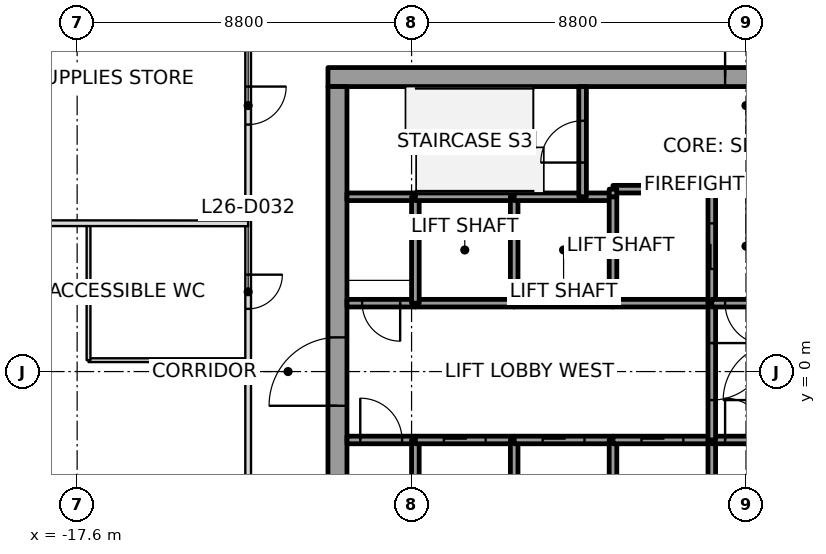
"""IFC4 building model, lengths in metres.
Left out: names, types, materials, properties, quantities, classifications, styles, units other than length and angle.
Written with IfcOpenShell. Run it as: python <this file> out.ifc"""

import sys

from ifc_helpers import new_model, si_unit, direction, frame, frame_2d, origin, place, context, subcontext, project, spatial, rectangle, extrude, element, fill, save


model = new_model("IFC4")
c1 = context("Model", 3, precision=1e-05, world=origin(), true_north=direction((0.0, 1.0)))
c2 = subcontext(c1, "Body", "Model", "MODEL_VIEW")
j1 = project(units=[si_unit("LENGTHUNIT", "METRE"), si_unit("PLANEANGLEUNIT", "RADIAN")], contexts=[c1])
p1 = place(None, origin())
s1 = spatial("IfcSite", under=j1, at=p1, CompositionType="ELEMENT")
p2 = place(p1, origin())
s2 = spatial("IfcBuilding", under=s1, at=p2, CompositionType="ELEMENT")
p3 = place(p2, frame((0.0, 0.0, 125.8)))
s3 = spatial("IfcBuildingStorey", under=s2, at=p3, CompositionType="ELEMENT", Elevation=125.8)
p4 = place(p3, frame((-11.0, 7.75, 0.0), z_axis=(0.0, 0.0, 1.0), x_axis=(1.0, 0.0, 0.0)))
e1 = element("IfcWall", 1, at=p4, inside=s3, PredefinedType="SHEAR", context=c2, shape_type="SweptSolid", body=[
    extrude(rectangle(XDim=22.0, YDim=0.5, at=frame_2d((11.0, 0.0))), origin(), (0.0, 0.0, 1.0), 4.0),
])
p5 = place(p4, frame((10.45, 0.0, 0.0)))
e2 = element("IfcOpeningElement", 2, at=p5, cuts=e1, PredefinedType="OPENING", context=c2, shape_type="SweptSolid", body=[
    extrude(rectangle(XDim=1.1, YDim=2.1, at=frame_2d((0.55, 1.05))), frame((0.0, 0.25, 0.0), z_axis=(0.0, -1.0, 0.0), x_axis=(1.0, 0.0, 0.0)), (0.0, 0.0, 1.0), 0.5),
])
p6 = place(p3, frame((-10.75, -7.5, 0.0), z_axis=(0.0, 0.0, 1.0), x_axis=(0.0, 1.0, 0.0)))
e3 = element("IfcWall", 3, at=p6, inside=s3, PredefinedType="SHEAR", context=c2, shape_type="SweptSolid", body=[
    extrude(rectangle(XDim=15.0, YDim=0.5, at=frame_2d((7.5, 0.0))), origin(), (0.0, 0.0, 1.0), 4.0),
])
p7 = place(p6, frame((6.6, 0.0, 0.0)))
e4 = element("IfcOpeningElement", 4, at=p7, cuts=e3, PredefinedType="OPENING", context=c2, shape_type="SweptSolid", body=[
    extrude(rectangle(XDim=1.8, YDim=2.1, at=frame_2d((0.9, 1.05))), frame((0.0, 0.25, 0.0), z_axis=(0.0, -1.0, 0.0), x_axis=(1.0, 0.0, 0.0)), (0.0, 0.0, 1.0), 0.5),
])
p8 = place(p3, frame((-10.5, -1.8, 0.0), z_axis=(0.0, 0.0, 1.0), x_axis=(1.0, 0.0, 0.0)))
e5 = element("IfcWall", 5, at=p8, inside=s3, PredefinedType="SOLIDWALL", context=c2, shape_type="SweptSolid", body=[
    extrude(rectangle(XDim=1.8, YDim=0.2, at=frame_2d((0.9, 0.0))), origin(), (0.0, 0.0, 1.0), 3.85),
])
p9 = place(p8, frame((0.35, 0.0, 0.0)))
e6 = element("IfcOpeningElement", 6, at=p9, cuts=e5, PredefinedType="OPENING", context=c2, shape_type="SweptSolid", body=[
    extrude(rectangle(XDim=1.1, YDim=2.1, at=frame_2d((0.55, 1.05))), frame((0.0, 0.1, 0.0), z_axis=(0.0, -1.0, 0.0), x_axis=(1.0, 0.0, 0.0)), (0.0, 0.0, 1.0), 0.2),
])
p10 = place(p3, frame((-8.7, 1.8, 0.0), z_axis=(0.0, 0.0, 1.0), x_axis=(-1.0, 0.0, 0.0)))
e7 = element("IfcWall", 7, at=p10, inside=s3, PredefinedType="SOLIDWALL", context=c2, shape_type="SweptSolid", body=[
    extrude(rectangle(XDim=1.8, YDim=0.2, at=frame_2d((0.9, 0.0))), origin(), (0.0, 0.0, 1.0), 3.85),
])
p11 = place(p10, frame((0.4, 0.0, 0.0)))
e8 = element("IfcOpeningElement", 8, at=p11, cuts=e7, PredefinedType="OPENING", context=c2, shape_type="SweptSolid", body=[
    extrude(rectangle(XDim=1.0, YDim=2.1, at=frame_2d((0.5, 1.05))), frame((0.0, 0.1, 0.0), z_axis=(0.0, -1.0, 0.0), x_axis=(1.0, 0.0, 0.0)), (0.0, 0.0, 1.0), 0.2),
])
p12 = place(p3, frame((-8.7, 4.6, 0.0), z_axis=(0.0, 0.0, 1.0), x_axis=(-1.0, 0.0, 0.0)))
e9 = element("IfcWall", 9, at=p12, inside=s3, PredefinedType="SOLIDWALL", context=c2, shape_type="SweptSolid", body=[
    extrude(rectangle(XDim=1.8, YDim=0.2, at=frame_2d((0.9, 0.0))), origin(), (0.0, 0.0, 1.0), 3.85),
])
p13 = place(p3, frame((-8.7, -4.6, 0.0), z_axis=(0.0, 0.0, 1.0), x_axis=(0.0, 1.0, 0.0)))
e10 = element("IfcWall", 10, at=p13, inside=s3, PredefinedType="SOLIDWALL", context=c2, shape_type="SweptSolid", body=[
    extrude(rectangle(XDim=2.8, YDim=0.2, at=frame_2d((1.4, 0.0))), origin(), (0.0, 0.0, 1.0), 3.85),
])
p14 = place(p3, frame((-8.7, -1.8, 0.0), z_axis=(0.0, 0.0, 1.0), x_axis=(1.0, 0.0, 0.0)))
e11 = element("IfcWall", 11, at=p14, inside=s3, PredefinedType="SOLIDWALL", context=c2, shape_type="SweptSolid", body=[
    extrude(rectangle(XDim=2.6, YDim=0.2, at=frame_2d((1.3, 0.0))), origin(), (0.0, 0.0, 1.0), 3.85),
])
p15 = place(p14, frame((0.75, 0.0, 0.0)))
e12 = element("IfcOpeningElement", 12, at=p15, cuts=e11, PredefinedType="OPENING", context=c2, shape_type="SweptSolid", body=[
    extrude(rectangle(XDim=1.1, YDim=2.1, at=frame_2d((0.55, 1.05))), frame((0.0, 0.1, 0.0), z_axis=(0.0, -1.0, 0.0), x_axis=(1.0, 0.0, 0.0)), (0.0, 0.0, 1.0), 0.2),
])
p16 = place(p3, frame((-6.1, 1.8, 0.0), z_axis=(0.0, 0.0, 1.0), x_axis=(-1.0, 0.0, 0.0)))
e13 = element("IfcWall", 13, at=p16, inside=s3, PredefinedType="SOLIDWALL", context=c2, shape_type="SweptSolid", body=[
    extrude(rectangle(XDim=2.6, YDim=0.2, at=frame_2d((1.3, 0.0))), origin(), (0.0, 0.0, 1.0), 3.85),
])
p17 = place(p3, frame((-8.7, 1.8, 0.0), z_axis=(0.0, 0.0, 1.0), x_axis=(0.0, 1.0, 0.0)))
e14 = element("IfcWall", 14, at=p17, inside=s3, PredefinedType="SOLIDWALL", context=c2, shape_type="SweptSolid", body=[
    extrude(rectangle(XDim=2.8, YDim=0.2, at=frame_2d((1.4, 0.0))), origin(), (0.0, 0.0, 1.0), 3.85),
])
p18 = place(p3, frame((-6.1, 4.6, 0.0), z_axis=(0.0, 0.0, 1.0), x_axis=(-1.0, 0.0, 0.0)))
e15 = element("IfcWall", 15, at=p18, inside=s3, PredefinedType="SOLIDWALL", context=c2, shape_type="SweptSolid", body=[
    extrude(rectangle(XDim=2.6, YDim=0.2, at=frame_2d((1.3, 0.0))), origin(), (0.0, 0.0, 1.0), 3.85),
])
p19 = place(p3, frame((-6.1, -4.6, 0.0), z_axis=(0.0, 0.0, 1.0), x_axis=(0.0, 1.0, 0.0)))
e16 = element("IfcWall", 16, at=p19, inside=s3, PredefinedType="SOLIDWALL", context=c2, shape_type="SweptSolid", body=[
    extrude(rectangle(XDim=2.8, YDim=0.2, at=frame_2d((1.4, 0.0))), origin(), (0.0, 0.0, 1.0), 3.85),
])
p20 = place(p3, frame((-6.1, -1.8, 0.0), z_axis=(0.0, 0.0, 1.0), x_axis=(1.0, 0.0, 0.0)))
e17 = element("IfcWall", 17, at=p20, inside=s3, PredefinedType="SOLIDWALL", context=c2, shape_type="SweptSolid", body=[
    extrude(rectangle(XDim=2.6, YDim=0.2, at=frame_2d((1.3, 0.0))), origin(), (0.0, 0.0, 1.0), 3.85),
])
p21 = place(p20, frame((0.75, 0.0, 0.0)))
e18 = element("IfcOpeningElement", 18, at=p21, cuts=e17, PredefinedType="OPENING", context=c2, shape_type="SweptSolid", body=[
    extrude(rectangle(XDim=1.1, YDim=2.1, at=frame_2d((0.55, 1.05))), frame((0.0, 0.1, 0.0), z_axis=(0.0, -1.0, 0.0), x_axis=(1.0, 0.0, 0.0)), (0.0, 0.0, 1.0), 0.2),
])
p22 = place(p3, frame((-3.5, 1.8, 0.0), z_axis=(0.0, 0.0, 1.0), x_axis=(-1.0, 0.0, 0.0)))
e19 = element("IfcWall", 19, at=p22, inside=s3, PredefinedType="SOLIDWALL", context=c2, shape_type="SweptSolid", body=[
    extrude(rectangle(XDim=2.6, YDim=0.2, at=frame_2d((1.3, 0.0))), origin(), (0.0, 0.0, 1.0), 3.85),
])
p23 = place(p3, frame((-6.1, 1.8, 0.0), z_axis=(0.0, 0.0, 1.0), x_axis=(0.0, 1.0, 0.0)))
e20 = element("IfcWall", 20, at=p23, inside=s3, PredefinedType="SOLIDWALL", context=c2, shape_type="SweptSolid", body=[
    extrude(rectangle(XDim=2.8, YDim=0.2, at=frame_2d((1.4, 0.0))), origin(), (0.0, 0.0, 1.0), 3.85),
])
p24 = place(p3, frame((-4.3, 4.6, 0.0), z_axis=(0.0, 0.0, 1.0), x_axis=(-1.0, 0.0, 0.0)))
e21 = element("IfcWall", 21, at=p24, inside=s3, PredefinedType="SOLIDWALL", context=c2, shape_type="SweptSolid", body=[
    extrude(rectangle(XDim=1.8, YDim=0.2, at=frame_2d((0.9, 0.0))), origin(), (0.0, 0.0, 1.0), 3.85),
])
p25 = place(p3, frame((-3.5, 4.6, 0.0), z_axis=(0.0, 0.0, 1.0), x_axis=(-1.0, 0.0, 0.0)))
e22 = element("IfcWall", 22, at=p25, inside=s3, PredefinedType="SOLIDWALL", context=c2, shape_type="SweptSolid", body=[
    extrude(rectangle(XDim=0.8, YDim=0.2, at=frame_2d((0.4, 0.0))), origin(), (0.0, 0.0, 1.0), 3.85),
])
p26 = place(p3, frame((-4.3, 4.6, 0.0), z_axis=(0.0, 0.0, 1.0), x_axis=(0.0, 1.0, 0.0)))
e23 = element("IfcWall", 23, at=p26, inside=s3, PredefinedType="SOLIDWALL", context=c2, shape_type="SweptSolid", body=[
    extrude(rectangle(XDim=2.9, YDim=0.2, at=frame_2d((1.45, 0.0))), origin(), (0.0, 0.0, 1.0), 3.85),
])
p27 = place(p26, frame((0.9, 0.0, 0.0)))
e24 = element("IfcOpeningElement", 24, at=p27, cuts=e23, PredefinedType="OPENING", context=c2, shape_type="SweptSolid", body=[
    extrude(rectangle(XDim=1.1, YDim=2.1, at=frame_2d((0.55, 1.05))), frame((0.0, 0.1, 0.0), z_axis=(0.0, -1.0, 0.0), x_axis=(1.0, 0.0, 0.0)), (0.0, 0.0, 1.0), 0.2),
])
p28 = place(p3, frame((-3.5, -4.6, 0.0), z_axis=(0.0, 0.0, 1.0), x_axis=(0.0, 1.0, 0.0)))
e25 = element("IfcWall", 25, at=p28, inside=s3, PredefinedType="SOLIDWALL", context=c2, shape_type="SweptSolid", body=[
    extrude(rectangle(XDim=2.8, YDim=0.2, at=frame_2d((1.4, 0.0))), origin(), (0.0, 0.0, 1.0), 3.85),
])
p29 = place(p3, frame((-3.5, -1.8, 0.0), z_axis=(0.0, 0.0, 1.0), x_axis=(1.0, 0.0, 0.0)))
e26 = element("IfcWall", 26, at=p29, inside=s3, PredefinedType="SOLIDWALL", context=c2, shape_type="SweptSolid", body=[
    extrude(rectangle(XDim=2.6, YDim=0.2, at=frame_2d((1.3, 0.0))), origin(), (0.0, 0.0, 1.0), 3.85),
])
p30 = place(p29, frame((0.75, 0.0, 0.0)))
e27 = element("IfcOpeningElement", 27, at=p30, cuts=e26, PredefinedType="OPENING", context=c2, shape_type="SweptSolid", body=[
    extrude(rectangle(XDim=1.1, YDim=2.1, at=frame_2d((0.55, 1.05))), frame((0.0, 0.1, 0.0), z_axis=(0.0, -1.0, 0.0), x_axis=(1.0, 0.0, 0.0)), (0.0, 0.0, 1.0), 0.2),
])
p31 = place(p3, frame((-0.9, 1.8, 0.0), z_axis=(0.0, 0.0, 1.0), x_axis=(-1.0, 0.0, 0.0)))
e28 = element("IfcWall", 28, at=p31, inside=s3, PredefinedType="SOLIDWALL", context=c2, shape_type="SweptSolid", body=[
    extrude(rectangle(XDim=2.6, YDim=0.2, at=frame_2d((1.3, 0.0))), origin(), (0.0, 0.0, 1.0), 3.85),
])
p32 = place(p3, frame((-3.5, 4.6, 0.0), z_axis=(0.0, 0.0, 1.0), x_axis=(0.0, -1.0, 0.0)))
e29 = element("IfcWall", 29, at=p32, inside=s3, PredefinedType="SOLIDWALL", context=c2, shape_type="SweptSolid", body=[
    extrude(rectangle(XDim=2.8, YDim=0.2, at=frame_2d((1.4, 0.0))), origin(), (0.0, 0.0, 1.0), 3.85),
])
p33 = place(p3, frame((-0.9, 1.8, 0.0), z_axis=(0.0, 0.0, 1.0), x_axis=(0.0, 1.0, 0.0)))
e30 = element("IfcWall", 30, at=p33, inside=s3, PredefinedType="SOLIDWALL", context=c2, shape_type="SweptSolid", body=[
    extrude(rectangle(XDim=3.0, YDim=0.2, at=frame_2d((1.5, 0.0))), origin(), (0.0, 0.0, 1.0), 3.85),
])
p34 = place(p33, frame((0.9, 0.0, 0.0)))
e31 = element("IfcOpeningElement", 31, at=p34, cuts=e30, PredefinedType="OPENING", context=c2, shape_type="SweptSolid", body=[
    extrude(rectangle(XDim=1.2, YDim=2.1, at=frame_2d((0.6, 1.05))), frame((0.0, 0.1, 0.0), z_axis=(0.0, -1.0, 0.0), x_axis=(1.0, 0.0, 0.0)), (0.0, 0.0, 1.0), 0.2),
])
p35 = place(p3, frame((-0.9, 4.8, 0.0), z_axis=(0.0, 0.0, 1.0), x_axis=(-1.0, 0.0, 0.0)))
e32 = element("IfcWall", 32, at=p35, inside=s3, PredefinedType="SOLIDWALL", context=c2, shape_type="SweptSolid", body=[
    extrude(rectangle(XDim=2.6, YDim=0.2, at=frame_2d((1.3, 0.0))), origin(), (0.0, 0.0, 1.0), 3.85),
])
p36 = place(p3, frame((-3.5, 4.8, 0.0), z_axis=(0.0, 0.0, 1.0), x_axis=(0.0, -1.0, 0.0)))
e33 = element("IfcWall", 33, at=p36, inside=s3, PredefinedType="SOLIDWALL", context=c2, shape_type="SweptSolid", body=[
    extrude(rectangle(XDim=0.2, YDim=0.2, at=frame_2d((0.1, 0.0))), origin(), (0.0, 0.0, 1.0), 3.85),
])
p37 = place(p3, frame((-0.9, -4.6, 0.0), z_axis=(0.0, 0.0, 1.0), x_axis=(0.0, 1.0, 0.0)))
e34 = element("IfcWall", 34, at=p37, inside=s3, PredefinedType="SOLIDWALL", context=c2, shape_type="SweptSolid", body=[
    extrude(rectangle(XDim=2.8, YDim=0.2, at=frame_2d((1.4, 0.0))), origin(), (0.0, 0.0, 1.0), 3.85),
])
p38 = place(p3, frame((-0.9, -1.8, 0.0), z_axis=(0.0, 0.0, 1.0), x_axis=(1.0, 0.0, 0.0)))
e35 = element("IfcWall", 35, at=p38, inside=s3, PredefinedType="SOLIDWALL", context=c2, shape_type="SweptSolid", body=[
    extrude(rectangle(XDim=1.8, YDim=0.2, at=frame_2d((0.9, 0.0))), origin(), (0.0, 0.0, 1.0), 3.85),
])
p39 = place(p38, frame((0.35, 0.0, 0.0)))
e36 = element("IfcOpeningElement", 36, at=p39, cuts=e35, PredefinedType="OPENING", context=c2, shape_type="SweptSolid", body=[
    extrude(rectangle(XDim=1.1, YDim=2.1, at=frame_2d((0.55, 1.05))), frame((0.0, 0.1, 0.0), z_axis=(0.0, -1.0, 0.0), x_axis=(1.0, 0.0, 0.0)), (0.0, 0.0, 1.0), 0.2),
])
p40 = place(p3, frame((-0.9, 1.8, 0.0), z_axis=(0.0, 0.0, 1.0), x_axis=(0.0, -1.0, 0.0)))
e37 = element("IfcWall", 37, at=p40, inside=s3, PredefinedType="SOLIDWALL", context=c2, shape_type="SweptSolid", body=[
    extrude(rectangle(XDim=3.6, YDim=0.2, at=frame_2d((1.8, 0.0))), origin(), (0.0, 0.0, 1.0), 3.85),
])
p41 = place(p40, frame((1.05, 0.0, 0.0)))
e38 = element("IfcOpeningElement", 38, at=p41, cuts=e37, PredefinedType="OPENING", context=c2, shape_type="SweptSolid", body=[
    extrude(rectangle(XDim=1.5, YDim=2.1, at=frame_2d((0.75, 1.05))), frame((0.0, 0.1, 0.0), z_axis=(0.0, -1.0, 0.0), x_axis=(1.0, 0.0, 0.0)), (0.0, 0.0, 1.0), 0.2),
])
p42 = place(p3, frame((0.9, 1.8, 0.0), z_axis=(0.0, 0.0, 1.0), x_axis=(-1.0, 0.0, 0.0)))
e39 = element("IfcWall", 39, at=p42, inside=s3, PredefinedType="SOLIDWALL", context=c2, shape_type="SweptSolid", body=[
    extrude(rectangle(XDim=1.8, YDim=0.2, at=frame_2d((0.9, 0.0))), origin(), (0.0, 0.0, 1.0), 3.85),
])
p43 = place(p42, frame((0.35, 0.0, 0.0)))
e40 = element("IfcOpeningElement", 40, at=p43, cuts=e39, PredefinedType="OPENING", context=c2, shape_type="SweptSolid", body=[
    extrude(rectangle(XDim=1.1, YDim=2.1, at=frame_2d((0.55, 1.05))), frame((0.0, 0.1, 0.0), z_axis=(0.0, -1.0, 0.0), x_axis=(1.0, 0.0, 0.0)), (0.0, 0.0, 1.0), 0.2),
])
p44 = place(p3, frame((-13.1, 3.9, 0.0), z_axis=(0.0, 0.0, 1.0), x_axis=(-0.99999961506, 0.000877427823, 0.0)))
e41 = element("IfcWall", 41, at=p44, inside=s3, PredefinedType="PARTITIONING", context=c2, shape_type="SweptSolid", body=[
    extrude(rectangle(XDim=10.017, YDim=0.15, at=frame_2d((5.008, 0.0))), origin(), (0.0, 0.0, 1.0), 3.234),
])
p45 = place(p3, frame((-13.1, 10.02, 0.0), z_axis=(0.0, 0.0, 1.0), x_axis=(0.0, -1.0, 0.0)))
e42 = element("IfcWall", 42, at=p45, inside=s3, PredefinedType="PARTITIONING", context=c2, shape_type="SweptSolid", body=[
    extrude(rectangle(XDim=20.04, YDim=0.15, at=frame_2d((10.02, 0.0))), origin(), (0.0, 0.0, 1.0), 3.166),
])
p46 = place(p45, frame((2.52, 0.0, 0.0)))
e43 = element("IfcOpeningElement", 43, at=p46, cuts=e42, PredefinedType="OPENING", context=c2, shape_type="SweptSolid", body=[
    extrude(rectangle(XDim=1.0, YDim=2.1, at=frame_2d((0.5, 1.05))), frame((0.0, 0.075, 0.0), z_axis=(0.0, -1.0, 0.0), x_axis=(1.0, 0.0, 0.0)), (0.0, 0.0, 1.0), 0.15),
])
p47 = place(p45, frame((7.47, 0.0, 0.0)))
e44 = element("IfcOpeningElement", 44, at=p47, cuts=e42, PredefinedType="OPENING", context=c2, shape_type="SweptSolid", body=[
    extrude(rectangle(XDim=0.9, YDim=2.1, at=frame_2d((0.45, 1.05))), frame((0.0, 0.075, 0.0), z_axis=(0.0, -1.0, 0.0), x_axis=(1.0, 0.0, 0.0)), (0.0, 0.0, 1.0), 0.15),
])
p48 = place(p45, frame((14.48, 0.0, 0.0)))
e45 = element("IfcOpeningElement", 45, at=p48, cuts=e42, PredefinedType="OPENING", context=c2, shape_type="SweptSolid", body=[
    extrude(rectangle(XDim=1.0, YDim=2.1, at=frame_2d((0.5, 1.05))), frame((0.0, 0.075, 0.0), z_axis=(0.0, -1.0, 0.0), x_axis=(1.0, 0.0, 0.0)), (0.0, 0.0, 1.0), 0.15),
])
p49 = place(p3, frame((-13.13, 0.3, 0.0), z_axis=(0.0, 0.0, 1.0), x_axis=(-1.0, 0.0, 0.0)))
e46 = element("IfcWall", 46, at=p49, inside=s3, PredefinedType="PARTITIONING", context=c2, shape_type="SweptSolid", body=[
    extrude(rectangle(XDim=4.17, YDim=0.1, at=frame_2d((2.085, 0.0))), origin(), (0.0, 0.0, 1.0), 3.45),
])
p50 = place(p3, frame((-17.3, 0.3, 0.0), z_axis=(0.0, 0.0, 1.0), x_axis=(0.0, 1.0, 0.0)))
e47 = element("IfcWall", 47, at=p50, inside=s3, PredefinedType="PARTITIONING", context=c2, shape_type="SweptSolid", body=[
    extrude(rectangle(XDim=3.57, YDim=0.1, at=frame_2d((1.785, 0.0))), origin(), (0.0, 0.0, 1.0), 3.45),
])
p51 = place(p46, origin())
e48 = element("IfcDoor", 48, at=p51, inside=s3, OperationType="SINGLE_SWING_LEFT", PredefinedType="DOOR", context=c2, shape_type="SweptSolid", body=[
    extrude(rectangle(XDim=1.0, YDim=2.1, at=frame_2d((0.5, 1.05))), frame((0.0, 0.025, 0.0), z_axis=(0.0, -1.0, 0.0), x_axis=(1.0, 0.0, 0.0)), (0.0, 0.0, 1.0), 0.05),
])
fill(e43, e48)
p52 = place(p47, origin())
e49 = element("IfcDoor", 49, at=p52, inside=s3, OperationType="SINGLE_SWING_LEFT", PredefinedType="DOOR", context=c2, shape_type="SweptSolid", body=[
    extrude(rectangle(XDim=0.9, YDim=2.1, at=frame_2d((0.45, 1.05))), frame((0.0, 0.025, 0.0), z_axis=(0.0, -1.0, 0.0), x_axis=(1.0, 0.0, 0.0)), (0.0, 0.0, 1.0), 0.05),
])
fill(e44, e49)
p53 = place(p15, origin())
e50 = element("IfcDoor", 50, at=p53, inside=s3, OperationType="SLIDING_TO_RIGHT", PredefinedType="DOOR", context=c2, shape_type="SweptSolid", body=[
    extrude(rectangle(XDim=1.1, YDim=2.1, at=frame_2d((0.55, 1.05))), frame((0.0, 0.025, 0.0), z_axis=(0.0, -1.0, 0.0), x_axis=(1.0, 0.0, 0.0)), (0.0, 0.0, 1.0), 0.05),
])
fill(e12, e50)
p54 = place(p21, origin())
e51 = element("IfcDoor", 51, at=p54, inside=s3, OperationType="SLIDING_TO_RIGHT", PredefinedType="DOOR", context=c2, shape_type="SweptSolid", body=[
    extrude(rectangle(XDim=1.1, YDim=2.1, at=frame_2d((0.55, 1.05))), frame((0.0, 0.025, 0.0), z_axis=(0.0, -1.0, 0.0), x_axis=(1.0, 0.0, 0.0)), (0.0, 0.0, 1.0), 0.05),
])
fill(e18, e51)
p55 = place(p30, origin())
e52 = element("IfcDoor", 52, at=p55, inside=s3, OperationType="SLIDING_TO_RIGHT", PredefinedType="DOOR", context=c2, shape_type="SweptSolid", body=[
    extrude(rectangle(XDim=1.1, YDim=2.1, at=frame_2d((0.55, 1.05))), frame((0.0, 0.025, 0.0), z_axis=(0.0, -1.0, 0.0), x_axis=(1.0, 0.0, 0.0)), (0.0, 0.0, 1.0), 0.05),
])
fill(e27, e52)
p56 = place(p34, origin())
e53 = element("IfcDoor", 53, at=p56, inside=s3, OperationType="SLIDING_TO_RIGHT", PredefinedType="DOOR", context=c2, shape_type="SweptSolid", body=[
    extrude(rectangle(XDim=1.2, YDim=2.1, at=frame_2d((0.6, 1.05))), frame((0.0, 0.025, 0.0), z_axis=(0.0, -1.0, 0.0), x_axis=(1.0, 0.0, 0.0)), (0.0, 0.0, 1.0), 0.05),
])
fill(e31, e53)
p57 = place(p41, origin())
e54 = element("IfcDoor", 54, at=p57, inside=s3, OperationType="DOUBLE_DOOR_SINGLE_SWING", PredefinedType="DOOR", context=c2, shape_type="SweptSolid", body=[
    extrude(rectangle(XDim=1.5, YDim=2.1, at=frame_2d((0.75, 1.05))), frame((0.0, 0.025, 0.0), z_axis=(0.0, -1.0, 0.0), x_axis=(1.0, 0.0, 0.0)), (0.0, 0.0, 1.0), 0.05),
])
fill(e38, e54)
p58 = place(p9, origin())
e55 = element("IfcDoor", 55, at=p58, inside=s3, OperationType="SINGLE_SWING_RIGHT", PredefinedType="DOOR", context=c2, shape_type="SweptSolid", body=[
    extrude(rectangle(XDim=1.1, YDim=2.1, at=frame_2d((0.55, 1.05))), frame((0.0, 0.025, 0.0), z_axis=(0.0, -1.0, 0.0), x_axis=(1.0, 0.0, 0.0)), (0.0, 0.0, 1.0), 0.05),
])
fill(e6, e55)
p59 = place(p43, origin())
e56 = element("IfcDoor", 56, at=p59, inside=s3, OperationType="SINGLE_SWING_LEFT", PredefinedType="DOOR", context=c2, shape_type="SweptSolid", body=[
    extrude(rectangle(XDim=1.1, YDim=2.1, at=frame_2d((0.55, 1.05))), frame((0.0, 0.025, 0.0), z_axis=(0.0, -1.0, 0.0), x_axis=(1.0, 0.0, 0.0)), (0.0, 0.0, 1.0), 0.05),
])
fill(e40, e56)
p60 = place(p39, origin())
e57 = element("IfcDoor", 57, at=p60, inside=s3, OperationType="SINGLE_SWING_LEFT", PredefinedType="DOOR", context=c2, shape_type="SweptSolid", body=[
    extrude(rectangle(XDim=1.1, YDim=2.1, at=frame_2d((0.55, 1.05))), frame((0.0, 0.025, 0.0), z_axis=(0.0, -1.0, 0.0), x_axis=(1.0, 0.0, 0.0)), (0.0, 0.0, 1.0), 0.05),
])
fill(e36, e57)
p61 = place(p11, origin())
e58 = element("IfcDoor", 58, at=p61, inside=s3, OperationType="SINGLE_SWING_RIGHT", PredefinedType="DOOR", context=c2, shape_type="SweptSolid", body=[
    extrude(rectangle(XDim=1.0, YDim=2.1, at=frame_2d((0.5, 1.05))), frame((0.0, 0.025, 0.0), z_axis=(0.0, -1.0, 0.0), x_axis=(1.0, 0.0, 0.0)), (0.0, 0.0, 1.0), 0.05),
])
fill(e8, e58)
p62 = place(p27, origin())
e59 = element("IfcDoor", 59, at=p62, inside=s3, OperationType="SINGLE_SWING_LEFT", PredefinedType="DOOR", context=c2, shape_type="SweptSolid", body=[
    extrude(rectangle(XDim=1.1, YDim=2.1, at=frame_2d((0.55, 1.05))), frame((0.0, 0.025, 0.0), z_axis=(0.0, -1.0, 0.0), x_axis=(1.0, 0.0, 0.0)), (0.0, 0.0, 1.0), 0.05),
])
fill(e24, e59)
p63 = place(p7, origin())
e60 = element("IfcDoor", 60, at=p63, inside=s3, OperationType="DOUBLE_DOOR_SINGLE_SWING", PredefinedType="DOOR", context=c2, shape_type="SweptSolid", body=[
    extrude(rectangle(XDim=1.8, YDim=2.1, at=frame_2d((0.9, 1.05))), frame((0.0, 0.025, 0.0), z_axis=(0.0, -1.0, 0.0), x_axis=(1.0, 0.0, 0.0)), (0.0, 0.0, 1.0), 0.05),
])
fill(e4, e60)
p64 = place(p5, origin())
e61 = element("IfcDoor", 61, at=p64, inside=s3, OperationType="SINGLE_SWING_LEFT", PredefinedType="DOOR", context=c2, shape_type="SweptSolid", body=[
    extrude(rectangle(XDim=1.1, YDim=2.1, at=frame_2d((0.55, 1.05))), frame((0.0, 0.025, 0.0), z_axis=(0.0, -1.0, 0.0), x_axis=(1.0, 0.0, 0.0)), (0.0, 0.0, 1.0), 0.05),
])
fill(e2, e61)
save(model, sys.argv[1])
